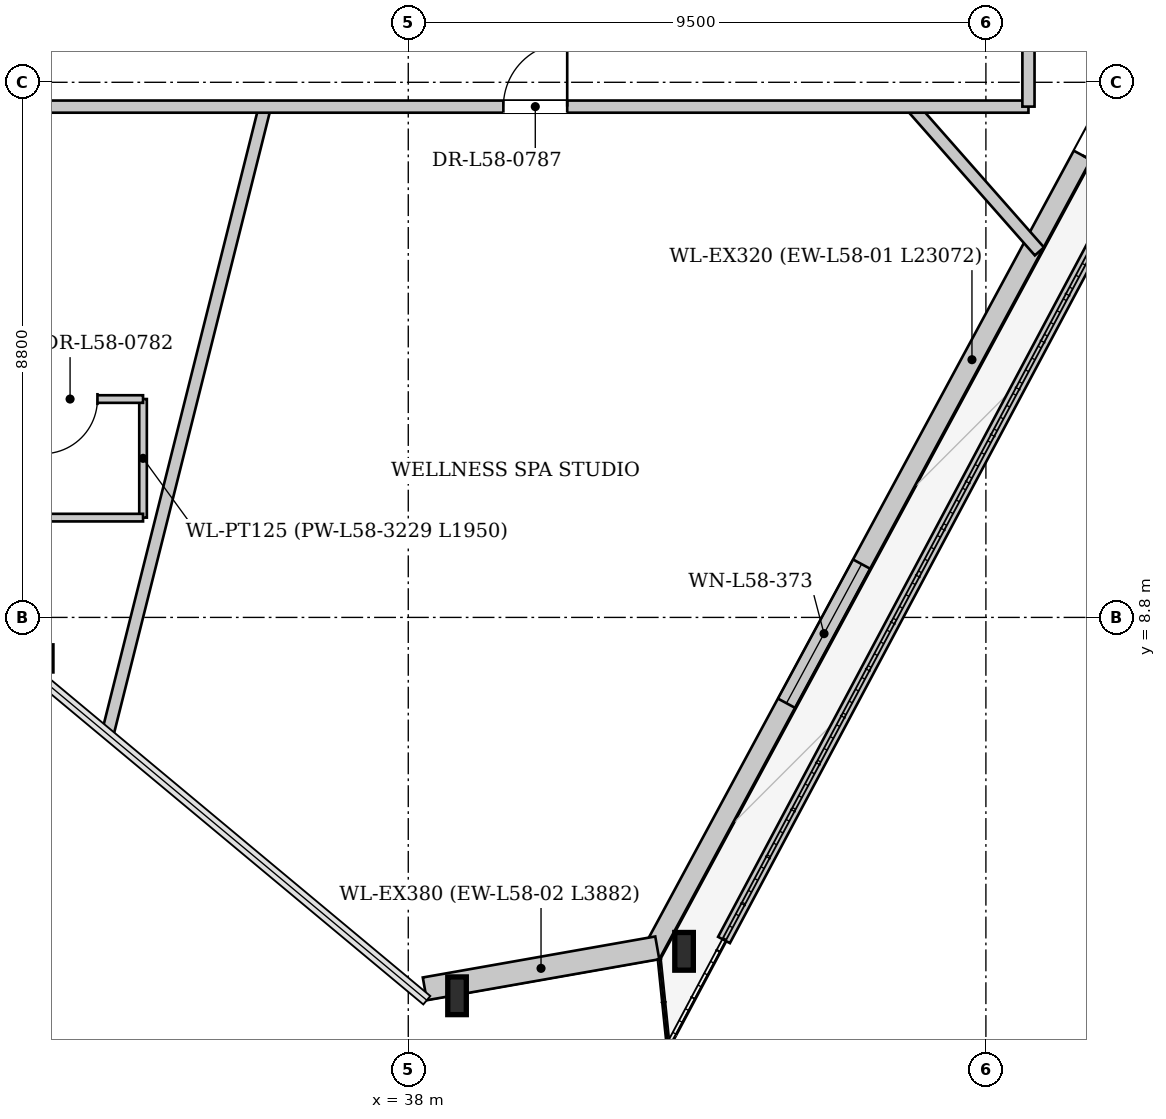
"""IFC4 building model, lengths in metres.
Left out: names, types, materials, properties, quantities, classifications, styles, units other than length and angle.
Written with IfcOpenShell. Run it as: python <this file> out.ifc"""

import sys

from ifc_helpers import new_model, si_unit, direction, frame, frame_2d, origin, origin_2d, place, context, subcontext, project, spatial, rectangle, i_section, extrude, source, transform, mapped, element, fill, save


model = new_model("IFC4")
c1 = context("Model", 3, precision=1e-05, world=origin(), true_north=direction((0.0, 1.0)))
c2 = subcontext(c1, "Body", "Model", "MODEL_VIEW")
j1 = project(units=[si_unit("LENGTHUNIT", "METRE"), si_unit("PLANEANGLEUNIT", "RADIAN")], contexts=[c1])
p1 = place(None, origin())
s1 = spatial("IfcSite", under=j1, at=p1, CompositionType="ELEMENT")
p2 = place(p1, origin())
s2 = spatial("IfcBuilding", under=s1, at=p2, CompositionType="ELEMENT")
p3 = place(p2, frame((0.0, 0.0, 220.25)))
s3 = spatial("IfcBuildingStorey", under=s2, at=p3, CompositionType="ELEMENT", Elevation=220.25)
m1 = source(origin(), c2, "Body", "SweptSolid", [
    extrude(i_section(OverallWidth=0.406, OverallDepth=0.416, WebThickness=0.027, FlangeThickness=0.042, at=origin_2d()), origin(), (0.0, 0.0, 1.0), 3.49),
])
p4 = place(p3, frame((31.515, 8.164, 0.0), z_axis=(0.242527231029, -0.021825352201, 0.96989906496), x_axis=(0.089629150551, 0.995975208211, 0.0)))
e1 = element("IfcColumn", 1, at=p4, inside=s3, PredefinedType="COLUMN", context=c2, shape_type="MappedRepresentation", body=[
    mapped(m1, transform((0.0, 0.0, 0.0), x_axis=(1.0, 0.0, 0.0), y_axis=(0.0, 1.0, 0.0), z_axis=(0.0, 0.0, 1.0), scale=1.0)),
])
m2 = source(origin(), c2, "Body", "SweptSolid", [
    extrude(i_section(OverallWidth=0.305, OverallDepth=0.62, WebThickness=0.021, FlangeThickness=0.04, at=origin_2d()), origin(), (0.0, 0.0, 1.0), 3.531),
])
p5 = place(p3, frame((38.305, 2.504, 0.0), z_axis=(0.281608973273, 0.041484258277, 0.95863206836), x_axis=(-0.145738734977, 0.989323112601, 0.0)))
e2 = element("IfcColumn", 2, at=p5, inside=s3, PredefinedType="COLUMN", context=c2, shape_type="MappedRepresentation", body=[
    mapped(m2, transform((0.0, 0.0, 0.0), x_axis=(1.0, 0.0, 0.0), y_axis=(0.0, 1.0, 0.0), z_axis=(0.0, 0.0, 1.0), scale=1.0)),
])
m3 = source(origin(), c2, "Body", "SweptSolid", [
    extrude(i_section(OverallWidth=0.305, OverallDepth=0.62, WebThickness=0.021, FlangeThickness=0.04, at=origin_2d()), origin(), (0.0, 0.0, 1.0), 3.492),
])
p6 = place(p3, frame((42.128, 3.178, 0.0), z_axis=(0.23360959757, 0.0745369144, 0.969469341607), x_axis=(-0.303968592861, 0.952682053234, 0.0)))
e3 = element("IfcColumn", 3, at=p6, inside=s3, PredefinedType="COLUMN", context=c2, shape_type="MappedRepresentation", body=[
    mapped(m3, transform((0.0, 0.0, 0.0), x_axis=(1.0, 0.0, 0.0), y_axis=(0.0, 1.0, 0.0), z_axis=(0.0, 0.0, 1.0), scale=1.0)),
])
p7 = place(p3, frame((52.95, 23.555, 0.0), z_axis=(0.0, 0.0, 1.0), x_axis=(-0.475160220621, -0.879899292385, 0.0)))
e4 = element("IfcWall", 4, at=p7, inside=s3, PredefinedType="SOLIDWALL", context=c2, shape_type="SweptSolid", body=[
    extrude(rectangle(XDim=23.072, YDim=0.32, at=frame_2d((11.536, 0.0))), origin(), (0.0, 0.0, 1.0), 2.822),
])
p8 = place(p7, frame((6.633, 0.0, 0.0)))
e5 = element("IfcOpeningElement", 5, at=p8, cuts=e4, PredefinedType="OPENING", context=c2, shape_type="SweptSolid", body=[
    extrude(rectangle(XDim=1.5, YDim=2.3, at=frame_2d((0.75, 1.15))), frame((0.0, 0.17, 0.0), z_axis=(0.0, -1.0, 0.0), x_axis=(1.0, 0.0, 0.0)), (0.0, 0.0, 1.0), 0.34),
])
p9 = place(p7, frame((15.773, 0.0, 0.352)))
e6 = element("IfcOpeningElement", 6, at=p9, cuts=e4, PredefinedType="OPENING", context=c2, shape_type="SweptSolid", body=[
    extrude(rectangle(XDim=2.6, YDim=2.35, at=frame_2d((1.3, 1.175))), frame((0.0, 0.17, 0.0), z_axis=(0.0, -1.0, 0.0), x_axis=(1.0, 0.0, 0.0)), (0.0, 0.0, 1.0), 0.34),
])
p10 = place(p3, frame((42.095, 3.365, 0.0), z_axis=(0.0, 0.0, 1.0), x_axis=(-0.984808873563, -0.173641822588, 0.0)))
e7 = element("IfcWall", 7, at=p10, inside=s3, PredefinedType="SOLIDWALL", context=c2, shape_type="SweptSolid", body=[
    extrude(rectangle(XDim=3.882, YDim=0.38, at=frame_2d((1.941, 0.0))), origin(), (0.0, 0.0, 1.0), 2.822),
])
p11 = place(p3, frame((43.193, 3.495, 0.0), z_axis=(0.0, 0.0, 1.0), x_axis=(0.4699616568, 0.882686830726, 0.0)))
e8 = element("IfcWall", 8, at=p11, inside=s3, PredefinedType="PARAPET", context=c2, shape_type="SweptSolid", body=[
    extrude(rectangle(XDim=20.551, YDim=0.22, at=frame_2d((10.275, 0.0))), origin(), (0.0, 0.0, 1.0), 0.3),
])
p12 = place(p3, frame((35.643, 17.2, 0.0), z_axis=(0.0, 0.0, 1.0), x_axis=(-0.243255959475, -0.969962132343, 0.0)))
e9 = element("IfcWall", 9, at=p12, inside=s3, PredefinedType="PARTITIONING", context=c2, shape_type="SweptSolid", body=[
    extrude(rectangle(XDim=10.605, YDim=0.2, at=frame_2d((5.303, 0.0))), origin(), (0.0, 0.0, 1.0), 3.33),
])
p13 = place(p3, frame((46.282, 17.2, 0.0), z_axis=(0.0, 0.0, 1.0), x_axis=(0.66111511251, -0.75028448472, 0.0)))
e10 = element("IfcWall", 10, at=p13, inside=s3, PredefinedType="PARTITIONING", context=c2, shape_type="SweptSolid", body=[
    extrude(rectangle(XDim=3.173, YDim=0.2, at=frame_2d((1.587, 0.0))), origin(), (0.0, 0.0, 1.0), 3.33),
])
p14 = place(p3, frame((33.638, 10.441, 0.0), z_axis=(0.0, 0.0, 1.0), x_axis=(0.0, 1.0, 0.0)))
e11 = element("IfcWall", 11, at=p14, inside=s3, PredefinedType="PARTITIONING", context=c2, shape_type="SweptSolid", body=[
    extrude(rectangle(XDim=1.95, YDim=0.125, at=frame_2d((0.975, 0.0))), origin(), (0.0, 0.0, 1.0), 3.33),
])
p15 = place(p3, frame((33.638, 12.391, 0.0), z_axis=(0.0, 0.0, 1.0), x_axis=(-1.0, 0.0, 0.0)))
e12 = element("IfcWall", 12, at=p15, inside=s3, PredefinedType="PARTITIONING", context=c2, shape_type="SweptSolid", body=[
    extrude(rectangle(XDim=2.4, YDim=0.125, at=frame_2d((1.2, 0.0))), origin(), (0.0, 0.0, 1.0), 3.33),
])
p16 = place(p15, frame((0.75, 0.0, 0.0)))
e13 = element("IfcOpeningElement", 13, at=p16, cuts=e12, PredefinedType="OPENING", context=c2, shape_type="SweptSolid", body=[
    extrude(rectangle(XDim=0.9, YDim=2.1, at=frame_2d((0.45, 1.05))), frame((0.0, 0.073, 0.0), z_axis=(0.0, -1.0, 0.0), x_axis=(1.0, 0.0, 0.0)), (0.0, 0.0, 1.0), 0.145),
])
p17 = place(p3, frame((31.238, 10.441, 0.0), z_axis=(0.0, 0.0, 1.0), x_axis=(1.0, 0.0, 0.0)))
e14 = element("IfcWall", 14, at=p17, inside=s3, PredefinedType="PARTITIONING", context=c2, shape_type="SweptSolid", body=[
    extrude(rectangle(XDim=2.4, YDim=0.125, at=frame_2d((1.2, 0.0))), origin(), (0.0, 0.0, 1.0), 3.33),
])
p18 = place(p3, frame((27.8, 17.2, 0.0), z_axis=(0.0, 0.0, 1.0), x_axis=(1.0, 0.0, 0.0)))
e15 = element("IfcWall", 15, at=p18, inside=s3, PredefinedType="PARTITIONING", context=c2, shape_type="SweptSolid", body=[
    extrude(rectangle(XDim=20.4, YDim=0.2, at=frame_2d((10.2, 0.0))), origin(), (0.0, 0.0, 1.0), 3.33),
])
p19 = place(p18, frame((1.255, 0.0, 0.0)))
e16 = element("IfcOpeningElement", 16, at=p19, cuts=e15, PredefinedType="OPENING", context=c2, shape_type="SweptSolid", body=[
    extrude(rectangle(XDim=1.05, YDim=2.2, at=frame_2d((0.525, 1.1))), frame((0.0, 0.11, 0.0), z_axis=(0.0, -1.0, 0.0), x_axis=(1.0, 0.0, 0.0)), (0.0, 0.0, 1.0), 0.22),
])
p20 = place(p18, frame((11.764, 0.0, 0.0)))
e17 = element("IfcOpeningElement", 17, at=p20, cuts=e15, PredefinedType="OPENING", context=c2, shape_type="SweptSolid", body=[
    extrude(rectangle(XDim=1.05, YDim=2.2, at=frame_2d((0.525, 1.1))), frame((0.0, 0.11, 0.0), z_axis=(0.0, -1.0, 0.0), x_axis=(1.0, 0.0, 0.0)), (0.0, 0.0, 1.0), 0.22),
])
p21 = place(p3, frame((48.2, 17.2, 0.0), z_axis=(0.0, 0.0, 1.0), x_axis=(0.0, 1.0, 0.0)))
e18 = element("IfcWall", 18, at=p21, inside=s3, PredefinedType="PARTITIONING", context=c2, shape_type="SweptSolid", body=[
    extrude(rectangle(XDim=18.8, YDim=0.2, at=frame_2d((9.4, 0.0))), origin(), (0.0, 0.0, 1.0), 3.015),
])
p22 = place(p21, frame((2.68, 0.0, 0.0)))
e19 = element("IfcOpeningElement", 19, at=p22, cuts=e18, PredefinedType="OPENING", context=c2, shape_type="SweptSolid", body=[
    extrude(rectangle(XDim=1.05, YDim=2.2, at=frame_2d((0.525, 1.1))), frame((0.0, 0.11, 0.0), z_axis=(0.0, -1.0, 0.0), x_axis=(1.0, 0.0, 0.0)), (0.0, 0.0, 1.0), 0.22),
])
p23 = place(p21, frame((17.45, 0.0, 0.0)))
e20 = element("IfcOpeningElement", 20, at=p23, cuts=e18, PredefinedType="OPENING", context=c2, shape_type="SweptSolid", body=[
    extrude(rectangle(XDim=1.05, YDim=2.2, at=frame_2d((0.525, 1.1))), frame((0.0, 0.11, 0.0), z_axis=(0.0, -1.0, 0.0), x_axis=(1.0, 0.0, 0.0)), (0.0, 0.0, 1.0), 0.22),
])
m4 = source(origin(), c2, "Body", "SweptSolid", [
    extrude(rectangle(XDim=1.5, YDim=2.3, at=frame_2d((0.75, 1.15))), frame((0.0, 0.025, 0.0), z_axis=(0.0, -1.0, 0.0), x_axis=(1.0, 0.0, 0.0)), (0.0, 0.0, 1.0), 0.05),
])
p24 = place(p8, origin())
e21 = element("IfcDoor", 21, at=p24, inside=s3, OperationType="DOUBLE_DOOR_SINGLE_SWING", PredefinedType="DOOR", context=c2, shape_type="MappedRepresentation", body=[
    mapped(m4, transform((0.0, 0.0, 0.0), x_axis=(1.0, 0.0, 0.0), y_axis=(0.0, 1.0, 0.0), z_axis=(0.0, 0.0, 1.0), scale=1.0)),
])
fill(e5, e21)
m5 = source(origin(), c2, "Body", "SweptSolid", [
    extrude(rectangle(XDim=2.6, YDim=2.35, at=frame_2d((1.3, 1.175))), frame((0.0, 0.03, 0.0), z_axis=(0.0, -1.0, 0.0), x_axis=(1.0, 0.0, 0.0)), (0.0, 0.0, 1.0), 0.06),
])
p25 = place(p9, origin())
e22 = element("IfcWindow", 22, at=p25, inside=s3, PartitioningType="SINGLE_PANEL", PredefinedType="WINDOW", context=c2, shape_type="MappedRepresentation", body=[
    mapped(m5, transform((0.0, 0.0, 0.0), x_axis=(1.0, 0.0, 0.0), y_axis=(0.0, 1.0, 0.0), z_axis=(0.0, 0.0, 1.0), scale=1.0)),
])
fill(e6, e22)
m6 = source(origin(), c2, "Body", "SweptSolid", [
    extrude(rectangle(XDim=0.9, YDim=2.1, at=frame_2d((0.45, 1.05))), frame((0.0, 0.025, 0.0), z_axis=(0.0, -1.0, 0.0), x_axis=(1.0, 0.0, 0.0)), (0.0, 0.0, 1.0), 0.05),
])
p26 = place(p16, origin())
e23 = element("IfcDoor", 23, at=p26, inside=s3, OperationType="SINGLE_SWING_RIGHT", PredefinedType="DOOR", context=c2, shape_type="MappedRepresentation", body=[
    mapped(m6, transform((0.0, 0.0, 0.0), x_axis=(1.0, 0.0, 0.0), y_axis=(0.0, 1.0, 0.0), z_axis=(0.0, 0.0, 1.0), scale=1.0)),
])
fill(e13, e23)
m7 = source(origin(), c2, "Body", "SweptSolid", [
    extrude(rectangle(XDim=1.05, YDim=2.2, at=frame_2d((0.525, 1.1))), frame((0.0, 0.025, 0.0), z_axis=(0.0, -1.0, 0.0), x_axis=(1.0, 0.0, 0.0)), (0.0, 0.0, 1.0), 0.05),
])
p27 = place(p20, origin())
e24 = element("IfcDoor", 24, at=p27, inside=s3, OperationType="SINGLE_SWING_RIGHT", PredefinedType="DOOR", context=c2, shape_type="MappedRepresentation", body=[
    mapped(m7, transform((0.0, 0.0, 0.0), x_axis=(1.0, 0.0, 0.0), y_axis=(0.0, 1.0, 0.0), z_axis=(0.0, 0.0, 1.0), scale=1.0)),
])
fill(e17, e24)
save(model, sys.argv[1])
